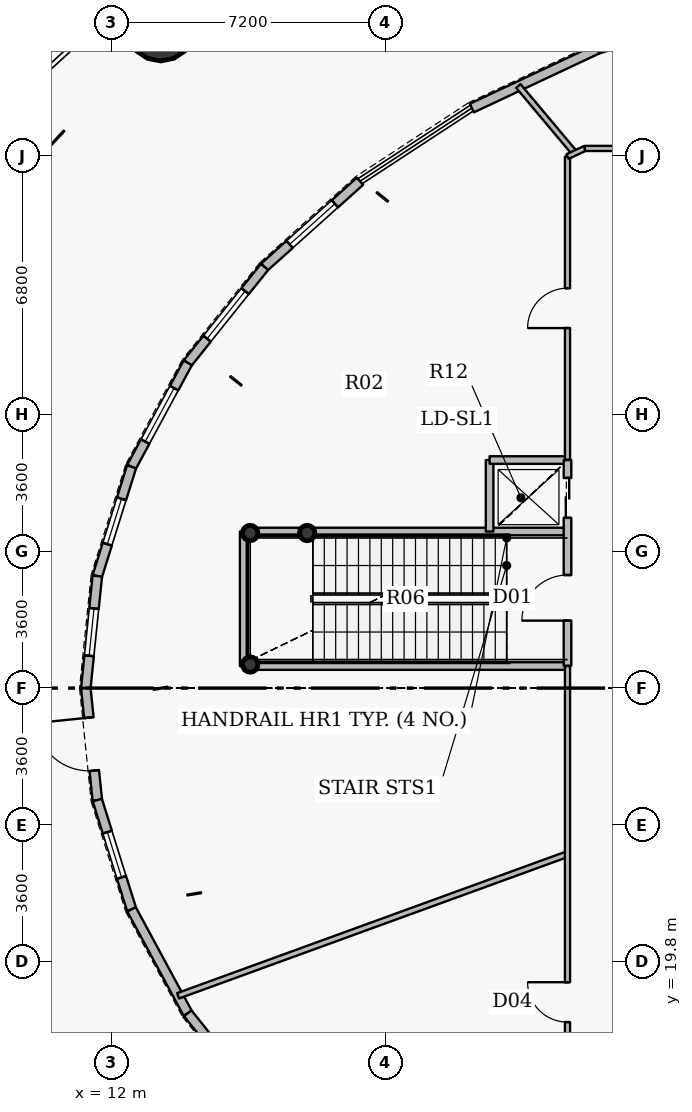
"""IFC4 building model, lengths in metres.
Left out: names, types, materials, properties, quantities, classifications, styles, units other than length and angle.
Written with IfcOpenShell. Run it as: python <this file> out.ifc"""

import sys

from ifc_helpers import new_model, si_unit, direction, frame, frame_2d, origin, origin_2d, place, context, subcontext, project, spatial, rectangle, hollow_circle, extrude, source, transform, mapped, element, fill, save


model = new_model("IFC4")
c1 = context("Model", 3, precision=1e-05, world=origin(), true_north=direction((0.0, 1.0)))
c2 = subcontext(c1, "Body", "Model", "MODEL_VIEW")
j1 = project(units=[si_unit("LENGTHUNIT", "METRE"), si_unit("PLANEANGLEUNIT", "RADIAN")], contexts=[c1])
p1 = place(None, origin())
s1 = spatial("IfcSite", under=j1, at=p1, CompositionType="ELEMENT")
p2 = place(p1, origin())
s2 = spatial("IfcBuilding", under=s1, at=p2, CompositionType="ELEMENT")
p3 = place(p2, frame((0.0, 0.0, 27.0)))
s3 = spatial("IfcBuildingStorey", under=s2, at=p3, CompositionType="ELEMENT", Elevation=27.0)
for number, where, z_axis, x_axis in (
    (1, (15.65, 27.62, 0.0), (0.0, 0.0, 1.0), (1.0, 0.0, 0.0)),
    (2, (15.65, 31.08, 0.0), (0.0, 0.0, 1.0), (1.0, 0.0, 0.0)),
    (3, (17.15, 31.08, 0.0), (0.0, 0.0, 1.0), (1.0, 0.0, 0.0)),
):
    element("IfcColumn", number, at=place(p3, frame(where, z_axis=z_axis, x_axis=x_axis)), inside=s3, PredefinedType="COLUMN", context=c2, shape_type="SweptSolid", body=[
        extrude(hollow_circle(Radius=0.203, WallThickness=0.016, at=origin_2d()), origin(), (0.0, 0.0, 1.0), 5.4),
    ])
p4 = place(p3, frame((13.295, 44.401, 0.0), z_axis=(0.0, 0.0, 1.0), x_axis=(1.0, 0.0, 0.0)))
e4 = element("IfcColumn", 4, at=p4, inside=s3, PredefinedType="COLUMN", context=c2, shape_type="SweptSolid", body=[
    extrude(hollow_circle(Radius=0.9, WallThickness=0.05, at=origin_2d()), origin(), (0.0, 0.0, 1.0), 5.15),
])
p5 = place(p3, frame((24.786, 43.813, 0.0), z_axis=(0.0, 0.0, 1.0), x_axis=(0.953166212936, 0.302446971412, 0.0)))
e5 = element("IfcWall", 5, at=p5, inside=s3, PredefinedType="SOLIDWALL", context=c2, shape_type="SweptSolid", body=[
    extrude(rectangle(XDim=3.756, YDim=0.25, at=frame_2d((1.878, 0.0))), origin(), (0.0, 0.0, 1.0), 3.185),
])
p6 = place(p5, frame((0.778, 0.0, 0.9)))
e6 = element("IfcOpeningElement", 6, at=p6, cuts=e5, PredefinedType="OPENING", context=c2, shape_type="SweptSolid", body=[
    extrude(rectangle(XDim=2.2, YDim=2.0, at=origin_2d()), frame((1.1, 0.135, 1.0), z_axis=(0.0, -1.0, 0.0), x_axis=(1.0, 0.0, 0.0)), (0.0, 0.0, 1.0), 0.27),
])
p7 = place(p3, frame((21.484, 42.262, 0.0), z_axis=(0.0, 0.0, 1.0), x_axis=(0.905208052634, 0.424968682901, 0.0)))
e7 = element("IfcWall", 7, at=p7, inside=s3, PredefinedType="SOLIDWALL", context=c2, shape_type="SweptSolid", body=[
    extrude(rectangle(XDim=3.649, YDim=0.25, at=frame_2d((1.824, 0.0))), origin(), (0.0, 0.0, 1.0), 5.15),
])
p8 = place(p3, frame((16.027, 38.082, 0.0), z_axis=(0.0, 0.0, 1.0), x_axis=(0.744436778288, 0.66769295573, 0.0)))
e8 = element("IfcWall", 8, at=p8, inside=s3, PredefinedType="SOLIDWALL", context=c2, shape_type="SweptSolid", body=[
    extrude(rectangle(XDim=3.375, YDim=0.25, at=frame_2d((1.688, 0.0))), origin(), (0.0, 0.0, 1.0), 3.185),
])
p9 = place(p8, frame((0.888, 0.0, 0.9)))
e9 = element("IfcOpeningElement", 9, at=p9, cuts=e8, PredefinedType="OPENING", context=c2, shape_type="SweptSolid", body=[
    extrude(rectangle(XDim=1.6, YDim=1.75, at=origin_2d()), frame((0.8, 0.135, 0.875), z_axis=(0.0, -1.0, 0.0), x_axis=(1.0, 0.0, 0.0)), (0.0, 0.0, 1.0), 0.27),
])
p10 = place(p3, frame((14.007, 35.557, 0.0), z_axis=(0.0, 0.0, 1.0), x_axis=(0.624639806262, 0.780912999272, 0.0)))
e10 = element("IfcWall", 10, at=p10, inside=s3, PredefinedType="SOLIDWALL", context=c2, shape_type="SweptSolid", body=[
    extrude(rectangle(XDim=3.234, YDim=0.25, at=frame_2d((1.617, 0.0))), origin(), (0.0, 0.0, 1.0), 3.185),
])
p11 = place(p10, frame((0.817, 0.0, 0.9)))
e11 = element("IfcOpeningElement", 11, at=p11, cuts=e10, PredefinedType="OPENING", context=c2, shape_type="SweptSolid", body=[
    extrude(rectangle(XDim=1.6, YDim=1.75, at=origin_2d()), frame((0.8, 0.135, 0.875), z_axis=(0.0, -1.0, 0.0), x_axis=(1.0, 0.0, 0.0)), (0.0, 0.0, 1.0), 0.27),
])
p12 = place(p3, frame((12.529, 32.823, 0.0), z_axis=(0.0, 0.0, 1.0), x_axis=(0.475607390776, 0.879657666276, 0.0)))
e12 = element("IfcWall", 12, at=p12, inside=s3, PredefinedType="SOLIDWALL", context=c2, shape_type="SweptSolid", body=[
    extrude(rectangle(XDim=3.108, YDim=0.25, at=frame_2d((1.554, 0.0))), origin(), (0.0, 0.0, 1.0), 3.185),
])
p13 = place(p12, frame((0.754, 0.0, 0.9)))
e13 = element("IfcOpeningElement", 13, at=p13, cuts=e12, PredefinedType="OPENING", context=c2, shape_type="SweptSolid", body=[
    extrude(rectangle(XDim=1.6, YDim=1.75, at=origin_2d()), frame((0.8, 0.135, 0.875), z_axis=(0.0, -1.0, 0.0), x_axis=(1.0, 0.0, 0.0)), (0.0, 0.0, 1.0), 0.27),
])
p14 = place(p3, frame((11.628, 29.947, 0.0), z_axis=(0.0, 0.0, 1.0), x_axis=(0.299040684125, 0.954240362402, 0.0)))
e14 = element("IfcWall", 14, at=p14, inside=s3, PredefinedType="SOLIDWALL", context=c2, shape_type="SweptSolid", body=[
    extrude(rectangle(XDim=3.013, YDim=0.25, at=frame_2d((1.507, 0.0))), origin(), (0.0, 0.0, 1.0), 5.15),
])
p15 = place(p14, frame((0.882, 0.0, 0.9)))
e15 = element("IfcOpeningElement", 15, at=p15, cuts=e14, PredefinedType="OPENING", context=c2, shape_type="SweptSolid", body=[
    extrude(rectangle(XDim=1.25, YDim=1.65, at=origin_2d()), frame((0.625, 0.135, 0.825), z_axis=(0.0, -1.0, 0.0), x_axis=(1.0, 0.0, 0.0)), (0.0, 0.0, 1.0), 0.27),
])
p16 = place(p3, frame((11.325, 27.0, 0.0), z_axis=(0.0, 0.0, 1.0), x_axis=(0.102187785323, 0.994765126314, 0.0)))
e16 = element("IfcWall", 16, at=p16, inside=s3, PredefinedType="SOLIDWALL", context=c2, shape_type="SweptSolid", body=[
    extrude(rectangle(XDim=2.963, YDim=0.25, at=frame_2d((1.481, 0.0))), origin(), (0.0, 0.0, 1.0), 3.185),
])
p17 = place(p16, frame((0.856, 0.0, 0.9)))
e17 = element("IfcOpeningElement", 17, at=p17, cuts=e16, PredefinedType="OPENING", context=c2, shape_type="SweptSolid", body=[
    extrude(rectangle(XDim=1.25, YDim=1.65, at=origin_2d()), frame((0.625, 0.135, 0.825), z_axis=(0.0, -1.0, 0.0), x_axis=(1.0, 0.0, 0.0)), (0.0, 0.0, 1.0), 0.27),
])
p18 = place(p3, frame((11.628, 24.053, 0.0), z_axis=(0.0, 0.0, 1.0), x_axis=(-0.102187785323, 0.994765126314, 0.0)))
e18 = element("IfcWall", 18, at=p18, inside=s3, PredefinedType="SOLIDWALL", context=c2, shape_type="SweptSolid", body=[
    extrude(rectangle(XDim=2.963, YDim=0.25, at=frame_2d((1.481, 0.0))), origin(), (0.0, 0.0, 1.0), 3.185),
])
p19 = place(p18, frame((0.781, 0.0, 0.0)))
e19 = element("IfcOpeningElement", 19, at=p19, cuts=e18, PredefinedType="OPENING", context=c2, shape_type="SweptSolid", body=[
    extrude(rectangle(XDim=1.4, YDim=2.2, at=origin_2d()), frame((0.7, 0.135, 1.1), z_axis=(0.0, -1.0, 0.0), x_axis=(1.0, 0.0, 0.0)), (0.0, 0.0, 1.0), 0.27),
])
p20 = place(p3, frame((12.529, 21.177, 0.0), z_axis=(0.0, 0.0, 1.0), x_axis=(-0.299040684125, 0.954240362402, 0.0)))
e20 = element("IfcWall", 20, at=p20, inside=s3, PredefinedType="SOLIDWALL", context=c2, shape_type="SweptSolid", body=[
    extrude(rectangle(XDim=3.013, YDim=0.25, at=frame_2d((1.507, 0.0))), origin(), (0.0, 0.0, 1.0), 3.185),
])
p21 = place(p20, frame((0.882, 0.0, 0.9)))
e21 = element("IfcOpeningElement", 21, at=p21, cuts=e20, PredefinedType="OPENING", context=c2, shape_type="SweptSolid", body=[
    extrude(rectangle(XDim=1.25, YDim=1.65, at=origin_2d()), frame((0.625, 0.135, 0.825), z_axis=(0.0, -1.0, 0.0), x_axis=(1.0, 0.0, 0.0)), (0.0, 0.0, 1.0), 0.27),
])
p22 = place(p3, frame((14.007, 18.443, 0.0), z_axis=(0.0, 0.0, 1.0), x_axis=(-0.475607390776, 0.879657666276, 0.0)))
e22 = element("IfcWall", 22, at=p22, inside=s3, PredefinedType="SOLIDWALL", context=c2, shape_type="SweptSolid", body=[
    extrude(rectangle(XDim=3.108, YDim=0.25, at=frame_2d((1.554, 0.0))), origin(), (0.0, 0.0, 1.0), 3.185),
])
p23 = place(p3, frame((16.027, 15.918, 0.0), z_axis=(0.0, 0.0, 1.0), x_axis=(-0.624639806262, 0.780912999272, 0.0)))
e23 = element("IfcWall", 23, at=p23, inside=s3, PredefinedType="SOLIDWALL", context=c2, shape_type="SweptSolid", body=[
    extrude(rectangle(XDim=3.234, YDim=0.25, at=frame_2d((1.617, 0.0))), origin(), (0.0, 0.0, 1.0), 5.15),
])
p24 = place(p23, frame((0.817, 0.0, 0.9)))
e24 = element("IfcOpeningElement", 24, at=p24, cuts=e23, PredefinedType="OPENING", context=c2, shape_type="SweptSolid", body=[
    extrude(rectangle(XDim=1.6, YDim=1.75, at=origin_2d()), frame((0.8, 0.135, 0.875), z_axis=(0.0, -1.0, 0.0), x_axis=(1.0, 0.0, 0.0)), (0.0, 0.0, 1.0), 0.27),
])
p25 = place(p3, frame((13.753, 18.903, 0.0), z_axis=(0.0, 0.0, 1.0), x_axis=(0.939694021803, 0.342016294038, 0.0)))
e25 = element("IfcWall", 25, at=p25, inside=s3, PredefinedType="PARTITIONING", context=c2, shape_type="SweptSolid", body=[
    extrude(rectangle(XDim=10.905, YDim=0.15, at=frame_2d((5.452, 0.0))), origin(), (0.0, 0.0, 1.0), 5.15),
])
p26 = place(p3, frame((15.48, 27.58, 0.0), z_axis=(0.0, 0.0, 1.0), x_axis=(0.0, 1.0, 0.0)))
e26 = element("IfcWall", 26, at=p26, inside=s3, PredefinedType="PARTITIONING", context=c2, shape_type="SweptSolid", body=[
    extrude(rectangle(XDim=3.54, YDim=0.2, at=frame_2d((1.77, 0.0))), origin(), (0.0, 0.0, 1.0), 5.15),
])
for number, where, z_axis, x_axis in (
    (27, (15.48, 27.58, 0.0), (0.0, 0.0, 1.0), (1.0, 0.0, 0.0)),
    (28, (15.48, 31.12, 0.0), (0.0, 0.0, 1.0), (1.0, 0.0, 0.0)),
):
    element("IfcWall", number, at=place(p3, frame(where, z_axis=z_axis, x_axis=x_axis)), inside=s3, PredefinedType="PARTITIONING", context=c2, shape_type="SweptSolid", body=[
        extrude(rectangle(XDim=8.52, YDim=0.2, at=frame_2d((4.26, 0.0))), origin(), (0.0, 0.0, 1.0), 5.15),
    ])
p27 = place(p3, frame((21.95, 31.12, 0.0), z_axis=(0.0, 0.0, 1.0), x_axis=(0.0, 1.0, 0.0)))
e29 = element("IfcWall", 29, at=p27, inside=s3, PredefinedType="PARTITIONING", context=c2, shape_type="SweptSolid", body=[
    extrude(rectangle(XDim=1.88, YDim=0.2, at=frame_2d((0.94, 0.0))), origin(), (0.0, 0.0, 1.0), 3.185),
])
p28 = place(p3, frame((21.95, 33.0, 0.0), z_axis=(0.0, 0.0, 1.0), x_axis=(1.0, 0.0, 0.0)))
e30 = element("IfcWall", 30, at=p28, inside=s3, PredefinedType="PARTITIONING", context=c2, shape_type="SweptSolid", body=[
    extrude(rectangle(XDim=2.05, YDim=0.2, at=frame_2d((1.025, 0.0))), origin(), (0.0, 0.0, 1.0), 5.15),
])
p29 = place(p3, frame((22.707, 42.842, 0.0), z_axis=(0.0, 0.0, 1.0), x_axis=(0.642762571273, -0.766065452145, 0.0)))
e31 = element("IfcWall", 31, at=p29, inside=s3, PredefinedType="PARTITIONING", context=c2, shape_type="SweptSolid", body=[
    extrude(rectangle(XDim=2.307, YDim=0.15, at=frame_2d((1.153, 0.0))), origin(), (0.0, 0.0, 1.0), 5.15),
])
p30 = place(p3, frame((24.0, 14.8, 0.0), z_axis=(0.0, 0.0, 1.0), x_axis=(0.0, 1.0, 0.0)))
e32 = element("IfcWall", 32, at=p30, inside=s3, PredefinedType="PARTITIONING", context=c2, shape_type="SweptSolid", body=[
    extrude(rectangle(XDim=12.78, YDim=0.135, at=frame_2d((6.39, 0.0))), origin(), (0.0, 0.0, 1.0), 3.185),
])
p31 = place(p30, frame((3.411, 0.0, 0.0)))
e33 = element("IfcOpeningElement", 33, at=p31, cuts=e32, PredefinedType="OPENING", context=c2, shape_type="SweptSolid", body=[
    extrude(rectangle(XDim=1.05, YDim=2.15, at=origin_2d()), frame((0.525, 0.078, 1.075), z_axis=(0.0, -1.0, 0.0), x_axis=(1.0, 0.0, 0.0)), (0.0, 0.0, 1.0), 0.155),
])
p32 = place(p3, frame((24.0, 27.59, 0.0), z_axis=(0.0, 0.0, 1.0), x_axis=(0.0, 1.0, 0.0)))
e34 = element("IfcWall", 34, at=p32, inside=s3, PredefinedType="PARTITIONING", context=c2, shape_type="SweptSolid", body=[
    extrude(rectangle(XDim=5.41, YDim=0.2, at=frame_2d((2.705, 0.0))), origin(), (0.0, 0.0, 1.0), 3.185),
])
p33 = place(p32, frame((1.185, 0.0, 0.0)))
e35 = element("IfcOpeningElement", 35, at=p33, cuts=e34, PredefinedType="OPENING", context=c2, shape_type="SweptSolid", body=[
    extrude(rectangle(XDim=1.2, YDim=2.15, at=origin_2d()), frame((0.6, 0.11, 1.075), z_axis=(0.0, -1.0, 0.0), x_axis=(1.0, 0.0, 0.0)), (0.0, 0.0, 1.0), 0.22),
])
p34 = place(p32, frame((3.89, 0.0, 0.0)))
e36 = element("IfcOpeningElement", 36, at=p34, cuts=e34, PredefinedType="OPENING", context=c2, shape_type="SweptSolid", body=[
    extrude(rectangle(XDim=1.05, YDim=2.15, at=origin_2d()), frame((0.525, 0.11, 1.075), z_axis=(0.0, -1.0, 0.0), x_axis=(1.0, 0.0, 0.0)), (0.0, 0.0, 1.0), 0.22),
])
p35 = place(p3, frame((24.0, 33.01, 0.0), z_axis=(0.0, 0.0, 1.0), x_axis=(0.0, 1.0, 0.0)))
e37 = element("IfcWall", 37, at=p35, inside=s3, PredefinedType="PARTITIONING", context=c2, shape_type="SweptSolid", body=[
    extrude(rectangle(XDim=7.976, YDim=0.135, at=frame_2d((3.988, 0.0))), origin(), (0.0, 0.0, 1.0), 3.185),
])
p36 = place(p35, frame((3.463, 0.0, 0.0)))
e38 = element("IfcOpeningElement", 38, at=p36, cuts=e37, PredefinedType="OPENING", context=c2, shape_type="SweptSolid", body=[
    extrude(rectangle(XDim=1.05, YDim=2.15, at=origin_2d()), frame((0.525, 0.078, 1.075), z_axis=(0.0, -1.0, 0.0), x_axis=(1.0, 0.0, 0.0)), (0.0, 0.0, 1.0), 0.155),
])
p37 = place(p3, frame((24.0, 40.986, 0.0), z_axis=(0.0, 0.0, 1.0), x_axis=(0.905313139204, 0.424744770404, 0.0)))
e39 = element("IfcWall", 39, at=p37, inside=s3, PredefinedType="PARTITIONING", context=c2, shape_type="SweptSolid", body=[
    extrude(rectangle(XDim=0.503, YDim=0.135, at=frame_2d((0.251, 0.0))), origin(), (0.0, 0.0, 1.0), 5.15),
])
p38 = place(p3, frame((24.456, 41.2, 0.0), z_axis=(0.0, 0.0, 1.0), x_axis=(1.0, 0.0, 0.0)))
e40 = element("IfcWall", 40, at=p38, inside=s3, PredefinedType="PARTITIONING", context=c2, shape_type="SweptSolid", body=[
    extrude(rectangle(XDim=23.087, YDim=0.135, at=frame_2d((11.544, 0.0))), origin(), (0.0, 0.0, 1.0), 3.185),
])
p39 = place(p38, frame((10.238, 0.0, 0.0)))
e41 = element("IfcOpeningElement", 41, at=p39, cuts=e40, PredefinedType="OPENING", context=c2, shape_type="SweptSolid", body=[
    extrude(rectangle(XDim=1.05, YDim=2.15, at=origin_2d()), frame((0.525, 0.078, 1.075), z_axis=(0.0, -1.0, 0.0), x_axis=(1.0, 0.0, 0.0)), (0.0, 0.0, 1.0), 0.155),
])
m1 = source(origin(), c2, "Body", "SweptSolid", [
    extrude(rectangle(XDim=1.6, YDim=1.75, at=origin_2d()), frame((0.8, 0.03, 0.875), z_axis=(0.0, -1.0, 0.0), x_axis=(1.0, 0.0, 0.0)), (0.0, 0.0, 1.0), 0.06),
])
p40 = place(p9, origin())
e42 = element("IfcWindow", 42, at=p40, inside=s3, PartitioningType="DOUBLE_PANEL_VERTICAL", PredefinedType="WINDOW", context=c2, shape_type="MappedRepresentation", body=[
    mapped(m1, transform((0.0, 0.0, 0.0), x_axis=(1.0, 0.0, 0.0), y_axis=(0.0, 1.0, 0.0), z_axis=(0.0, 0.0, 1.0), scale=1.0)),
])
fill(e9, e42)
p41 = place(p11, origin())
e43 = element("IfcWindow", 43, at=p41, inside=s3, PartitioningType="DOUBLE_PANEL_VERTICAL", PredefinedType="WINDOW", context=c2, shape_type="MappedRepresentation", body=[
    mapped(m1, transform((0.0, 0.0, 0.0), x_axis=(1.0, 0.0, 0.0), y_axis=(0.0, 1.0, 0.0), z_axis=(0.0, 0.0, 1.0), scale=1.0)),
])
fill(e11, e43)
p42 = place(p13, origin())
e44 = element("IfcWindow", 44, at=p42, inside=s3, PartitioningType="DOUBLE_PANEL_VERTICAL", PredefinedType="WINDOW", context=c2, shape_type="MappedRepresentation", body=[
    mapped(m1, transform((0.0, 0.0, 0.0), x_axis=(1.0, 0.0, 0.0), y_axis=(0.0, 1.0, 0.0), z_axis=(0.0, 0.0, 1.0), scale=1.0)),
])
fill(e13, e44)
m2 = source(origin(), c2, "Body", "SweptSolid", [
    extrude(rectangle(XDim=1.25, YDim=1.65, at=origin_2d()), frame((0.625, 0.03, 0.825), z_axis=(0.0, -1.0, 0.0), x_axis=(1.0, 0.0, 0.0)), (0.0, 0.0, 1.0), 0.06),
])
p43 = place(p15, origin())
e45 = element("IfcWindow", 45, at=p43, inside=s3, PartitioningType="SINGLE_PANEL", PredefinedType="WINDOW", context=c2, shape_type="MappedRepresentation", body=[
    mapped(m2, transform((0.0, 0.0, 0.0), x_axis=(1.0, 0.0, 0.0), y_axis=(0.0, 1.0, 0.0), z_axis=(0.0, 0.0, 1.0), scale=1.0)),
])
fill(e15, e45)
p44 = place(p17, origin())
e46 = element("IfcWindow", 46, at=p44, inside=s3, PartitioningType="SINGLE_PANEL", PredefinedType="WINDOW", context=c2, shape_type="MappedRepresentation", body=[
    mapped(m2, transform((0.0, 0.0, 0.0), x_axis=(1.0, 0.0, 0.0), y_axis=(0.0, 1.0, 0.0), z_axis=(0.0, 0.0, 1.0), scale=1.0)),
])
fill(e17, e46)
m3 = source(origin(), c2, "Body", "SweptSolid", [
    extrude(rectangle(XDim=1.4, YDim=2.2, at=origin_2d()), frame((0.7, 0.025, 1.1), z_axis=(0.0, -1.0, 0.0), x_axis=(1.0, 0.0, 0.0)), (0.0, 0.0, 1.0), 0.05),
])
p45 = place(p19, origin())
e47 = element("IfcDoor", 47, at=p45, inside=s3, OperationType="SINGLE_SWING_RIGHT", PredefinedType="DOOR", context=c2, shape_type="MappedRepresentation", body=[
    mapped(m3, transform((0.0, 0.0, 0.0), x_axis=(1.0, 0.0, 0.0), y_axis=(0.0, 1.0, 0.0), z_axis=(0.0, 0.0, 1.0), scale=1.0)),
])
fill(e19, e47)
p46 = place(p21, origin())
e48 = element("IfcWindow", 48, at=p46, inside=s3, PartitioningType="SINGLE_PANEL", PredefinedType="WINDOW", context=c2, shape_type="MappedRepresentation", body=[
    mapped(m2, transform((0.0, 0.0, 0.0), x_axis=(1.0, 0.0, 0.0), y_axis=(0.0, 1.0, 0.0), z_axis=(0.0, 0.0, 1.0), scale=1.0)),
])
fill(e21, e48)
m4 = source(origin(), c2, "Body", "SweptSolid", [
    extrude(rectangle(XDim=1.2, YDim=2.15, at=origin_2d()), frame((0.6, 0.025, 1.075), z_axis=(0.0, -1.0, 0.0), x_axis=(1.0, 0.0, 0.0)), (0.0, 0.0, 1.0), 0.05),
])
p47 = place(p33, origin())
e49 = element("IfcDoor", 49, at=p47, inside=s3, OperationType="SINGLE_SWING_LEFT", PredefinedType="DOOR", context=c2, shape_type="MappedRepresentation", body=[
    mapped(m4, transform((0.0, 0.0, 0.0), x_axis=(1.0, 0.0, 0.0), y_axis=(0.0, 1.0, 0.0), z_axis=(0.0, 0.0, 1.0), scale=1.0)),
])
fill(e35, e49)
m5 = source(origin(), c2, "Body", "SweptSolid", [
    extrude(rectangle(XDim=1.05, YDim=2.15, at=origin_2d()), frame((0.525, 0.025, 1.075), z_axis=(0.0, -1.0, 0.0), x_axis=(1.0, 0.0, 0.0)), (0.0, 0.0, 1.0), 0.05),
])
p48 = place(p34, origin())
e50 = element("IfcDoor", 50, at=p48, inside=s3, OperationType="DOUBLE_DOOR_SLIDING", PredefinedType="USERDEFINED", context=c2, shape_type="MappedRepresentation", body=[
    mapped(m5, transform((0.0, 0.0, 0.0), x_axis=(1.0, 0.0, 0.0), y_axis=(0.0, 1.0, 0.0), z_axis=(0.0, 0.0, 1.0), scale=1.0)),
])
fill(e36, e50)
m6 = source(origin(), c2, "Body", "SweptSolid", [
    extrude(rectangle(XDim=1.05, YDim=2.15, at=origin_2d()), frame((0.525, 0.025, 1.075), z_axis=(0.0, -1.0, 0.0), x_axis=(1.0, 0.0, 0.0)), (0.0, 0.0, 1.0), 0.05),
])
p49 = place(p36, origin())
e51 = element("IfcDoor", 51, at=p49, inside=s3, OperationType="SINGLE_SWING_LEFT", PredefinedType="DOOR", context=c2, shape_type="MappedRepresentation", body=[
    mapped(m6, transform((0.0, 0.0, 0.0), x_axis=(1.0, 0.0, 0.0), y_axis=(0.0, 1.0, 0.0), z_axis=(0.0, 0.0, 1.0), scale=1.0)),
])
fill(e38, e51)
p50 = place(p31, origin())
e52 = element("IfcDoor", 52, at=p50, inside=s3, OperationType="SINGLE_SWING_RIGHT", PredefinedType="DOOR", context=c2, shape_type="MappedRepresentation", body=[
    mapped(m6, transform((0.0, 0.0, 0.0), x_axis=(1.0, 0.0, 0.0), y_axis=(0.0, 1.0, 0.0), z_axis=(0.0, 0.0, 1.0), scale=1.0)),
])
fill(e33, e52)
save(model, sys.argv[1])
